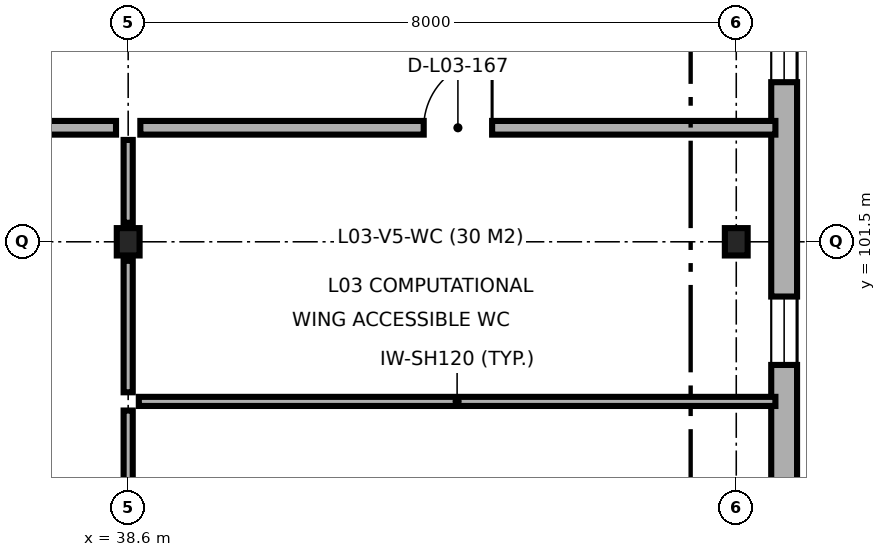
"""IFC4 building model, lengths in metres.
Left out: names, types, materials, properties, quantities, classifications, styles, units other than length and angle.
Written with IfcOpenShell. Run it as: python <this file> out.ifc"""

import sys

from ifc_helpers import new_model, si_unit, direction, frame, frame_2d, origin, origin_2d, place, context, subcontext, project, spatial, rectangle, i_section, extrude, element, fill, save


model = new_model("IFC4")
c1 = context("Model", 3, precision=1e-05, world=origin(), true_north=direction((0.0, 1.0)))
c2 = subcontext(c1, "Body", "Model", "MODEL_VIEW")
j1 = project(units=[si_unit("LENGTHUNIT", "METRE"), si_unit("PLANEANGLEUNIT", "RADIAN")], contexts=[c1])
p1 = place(None, origin())
s1 = spatial("IfcSite", under=j1, at=p1, CompositionType="ELEMENT")
p2 = place(p1, origin())
s2 = spatial("IfcBuilding", under=s1, at=p2, CompositionType="ELEMENT")
p3 = place(p2, frame((0.0, 0.0, 13.8)))
s3 = spatial("IfcBuildingStorey", under=s2, at=p3, CompositionType="ELEMENT", Elevation=13.8)
for number, where, z_axis, x_axis in (
    (1, (38.6, 101.5, 0.0), (0.0, 0.0, 1.0), (1.0, 0.0, 0.0)),
    (2, (46.6, 101.5, 0.0), (0.0, 0.0, 1.0), (1.0, 0.0, 0.0)),
):
    element("IfcColumn", number, at=place(p3, frame(where, z_axis=z_axis, x_axis=x_axis)), inside=s3, PredefinedType="COLUMN", context=c2, shape_type="SweptSolid", body=[
        extrude(i_section(OverallWidth=0.3, OverallDepth=0.36, WebThickness=0.012, FlangeThickness=0.022, FilletRadius=0.027, at=origin_2d()), origin(), (0.0, 0.0, 1.0), 4.5),
    ])
p4 = place(p3, frame((47.23, 88.623, 0.0), z_axis=(0.0, 0.0, 1.0), x_axis=(0.0, 1.0, 0.0)))
e3 = element("IfcWall", 3, at=p4, inside=s3, PredefinedType="SOLIDWALL", context=c2, shape_type="SweptSolid", body=[
    extrude(rectangle(XDim=27.477, YDim=0.34, at=frame_2d((13.739, 0.0))), origin(), (0.0, 0.0, 1.0), 4.25),
])
p5 = place(p4, frame((1.689, 0.0, 0.9)))
e4 = element("IfcOpeningElement", 4, at=p5, cuts=e3, PredefinedType="OPENING", context=c2, shape_type="SweptSolid", body=[
    extrude(rectangle(XDim=1.6, YDim=2.4, at=frame_2d((0.8, 1.2))), frame((0.0, 0.18, 0.0), z_axis=(0.0, -1.0, 0.0), x_axis=(1.0, 0.0, 0.0)), (0.0, 0.0, 1.0), 0.36),
])
p6 = place(p4, frame((6.647, 0.0, 0.9)))
e5 = element("IfcOpeningElement", 5, at=p6, cuts=e3, PredefinedType="OPENING", context=c2, shape_type="SweptSolid", body=[
    extrude(rectangle(XDim=2.6, YDim=2.4, at=frame_2d((1.3, 1.2))), frame((0.0, 0.18, 0.0), z_axis=(0.0, -1.0, 0.0), x_axis=(1.0, 0.0, 0.0)), (0.0, 0.0, 1.0), 0.36),
])
p7 = place(p4, frame((11.257, 0.0, 0.9)))
e6 = element("IfcOpeningElement", 6, at=p7, cuts=e3, PredefinedType="OPENING", context=c2, shape_type="SweptSolid", body=[
    extrude(rectangle(XDim=0.9, YDim=1.8, at=frame_2d((0.45, 0.9))), frame((0.0, 0.18, 0.0), z_axis=(0.0, -1.0, 0.0), x_axis=(1.0, 0.0, 0.0)), (0.0, 0.0, 1.0), 0.36),
])
p8 = place(p4, frame((14.977, 0.0, 0.9)))
e7 = element("IfcOpeningElement", 7, at=p8, cuts=e3, PredefinedType="OPENING", context=c2, shape_type="SweptSolid", body=[
    extrude(rectangle(XDim=1.2, YDim=1.8, at=frame_2d((0.6, 0.9))), frame((0.0, 0.18, 0.0), z_axis=(0.0, -1.0, 0.0), x_axis=(1.0, 0.0, 0.0)), (0.0, 0.0, 1.0), 0.36),
])
p9 = place(p4, frame((17.882, 0.0, 0.9)))
e8 = element("IfcOpeningElement", 8, at=p9, cuts=e3, PredefinedType="OPENING", context=c2, shape_type="SweptSolid", body=[
    extrude(rectangle(XDim=1.65, YDim=1.95, at=frame_2d((0.825, 0.975))), frame((0.0, 0.18, 0.0), z_axis=(0.0, -1.0, 0.0), x_axis=(1.0, 0.0, 0.0)), (0.0, 0.0, 1.0), 0.36),
])
p10 = place(p4, frame((22.742, 0.0, 0.9)))
e9 = element("IfcOpeningElement", 9, at=p10, cuts=e3, PredefinedType="OPENING", context=c2, shape_type="SweptSolid", body=[
    extrude(rectangle(XDim=2.25, YDim=1.95, at=frame_2d((1.125, 0.975))), frame((0.0, 0.18, 0.0), z_axis=(0.0, -1.0, 0.0), x_axis=(1.0, 0.0, 0.0)), (0.0, 0.0, 1.0), 0.36),
])
p11 = place(p3, frame((38.74, 99.4, 0.0), z_axis=(0.0, 0.0, 1.0), x_axis=(1.0, 0.0, 0.0)))
e10 = element("IfcWall", 10, at=p11, inside=s3, PredefinedType="PARTITIONING", context=c2, shape_type="SweptSolid", body=[
    extrude(rectangle(XDim=8.375, YDim=0.12, at=frame_2d((4.188, 0.0))), origin(), (0.0, 0.0, 1.0), 4.25),
])
p12 = place(p3, frame((38.6, 93.75, 0.0), z_axis=(0.0, 0.0, 1.0), x_axis=(0.0, 1.0, 0.0)))
e11 = element("IfcWall", 11, at=p12, inside=s3, PredefinedType="PARTITIONING", context=c2, shape_type="SweptSolid", body=[
    extrude(rectangle(XDim=5.53, YDim=0.12, at=frame_2d((2.765, 0.0))), origin(), (0.0, 0.0, 1.0), 3.85),
])
p13 = place(p3, frame((38.6, 99.52, 0.0), z_axis=(0.0, 0.0, 1.0), x_axis=(0.0, 1.0, 0.0)))
e12 = element("IfcWall", 12, at=p13, inside=s3, PredefinedType="PARTITIONING", context=c2, shape_type="SweptSolid", body=[
    extrude(rectangle(XDim=1.73, YDim=0.12, at=frame_2d((0.865, 0.0))), origin(), (0.0, 0.0, 1.0), 3.85),
])
p14 = place(p3, frame((38.6, 101.75, 0.0), z_axis=(0.0, 0.0, 1.0), x_axis=(0.0, 1.0, 0.0)))
e13 = element("IfcWall", 13, at=p14, inside=s3, PredefinedType="PARTITIONING", context=c2, shape_type="SweptSolid", body=[
    extrude(rectangle(XDim=1.09, YDim=0.12, at=frame_2d((0.545, 0.0))), origin(), (0.0, 0.0, 1.0), 3.85),
])
p15 = place(p3, frame((29.16, 103.0, 0.0), z_axis=(0.0, 0.0, 1.0), x_axis=(1.0, 0.0, 0.0)))
e14 = element("IfcWall", 14, at=p15, inside=s3, PredefinedType="PARTITIONING", context=c2, shape_type="SweptSolid", body=[
    extrude(rectangle(XDim=9.28, YDim=0.18, at=frame_2d((4.64, 0.0))), origin(), (0.0, 0.0, 1.0), 4.25),
])
p16 = place(p15, frame((4.09, 0.0, 0.0)))
e15 = element("IfcOpeningElement", 15, at=p16, cuts=e14, PredefinedType="OPENING", context=c2, shape_type="SweptSolid", body=[
    extrude(rectangle(XDim=1.1, YDim=2.15, at=frame_2d((0.55, 1.075))), frame((0.0, 0.1, 0.0), z_axis=(0.0, -1.0, 0.0), x_axis=(1.0, 0.0, 0.0)), (0.0, 0.0, 1.0), 0.2),
])
p17 = place(p3, frame((38.76, 103.0, 0.0), z_axis=(0.0, 0.0, 1.0), x_axis=(1.0, 0.0, 0.0)))
e16 = element("IfcWall", 16, at=p17, inside=s3, PredefinedType="PARTITIONING", context=c2, shape_type="SweptSolid", body=[
    extrude(rectangle(XDim=8.355, YDim=0.18, at=frame_2d((4.177, 0.0))), origin(), (0.0, 0.0, 1.0), 4.25),
])
p18 = place(p17, frame((3.728, 0.0, 0.0)))
e17 = element("IfcOpeningElement", 17, at=p18, cuts=e16, PredefinedType="OPENING", context=c2, shape_type="SweptSolid", body=[
    extrude(rectangle(XDim=0.9, YDim=2.1, at=frame_2d((0.45, 1.05))), frame((0.0, 0.1, 0.0), z_axis=(0.0, -1.0, 0.0), x_axis=(1.0, 0.0, 0.0)), (0.0, 0.0, 1.0), 0.2),
])
p19 = place(p7, origin())
e18 = element("IfcWindow", 18, at=p19, inside=s3, PartitioningType="SINGLE_PANEL", PredefinedType="WINDOW", context=c2, shape_type="SweptSolid", body=[
    extrude(rectangle(XDim=0.9, YDim=1.8, at=frame_2d((0.45, 0.9))), frame((0.0, 0.03, 0.0), z_axis=(0.0, -1.0, 0.0), x_axis=(1.0, 0.0, 0.0)), (0.0, 0.0, 1.0), 0.06),
])
fill(e6, e18)
p20 = place(p8, origin())
e19 = element("IfcWindow", 19, at=p20, inside=s3, PartitioningType="SINGLE_PANEL", PredefinedType="WINDOW", context=c2, shape_type="SweptSolid", body=[
    extrude(rectangle(XDim=1.2, YDim=1.8, at=frame_2d((0.6, 0.9))), frame((0.0, 0.03, 0.0), z_axis=(0.0, -1.0, 0.0), x_axis=(1.0, 0.0, 0.0)), (0.0, 0.0, 1.0), 0.06),
])
fill(e7, e19)
p21 = place(p18, origin())
e20 = element("IfcDoor", 20, at=p21, inside=s3, OperationType="SINGLE_SWING_RIGHT", PredefinedType="DOOR", context=c2, shape_type="SweptSolid", body=[
    extrude(rectangle(XDim=0.9, YDim=2.1, at=frame_2d((0.45, 1.05))), frame((0.0, 0.025, 0.0), z_axis=(0.0, -1.0, 0.0), x_axis=(1.0, 0.0, 0.0)), (0.0, 0.0, 1.0), 0.05),
])
fill(e17, e20)
save(model, sys.argv[1])
